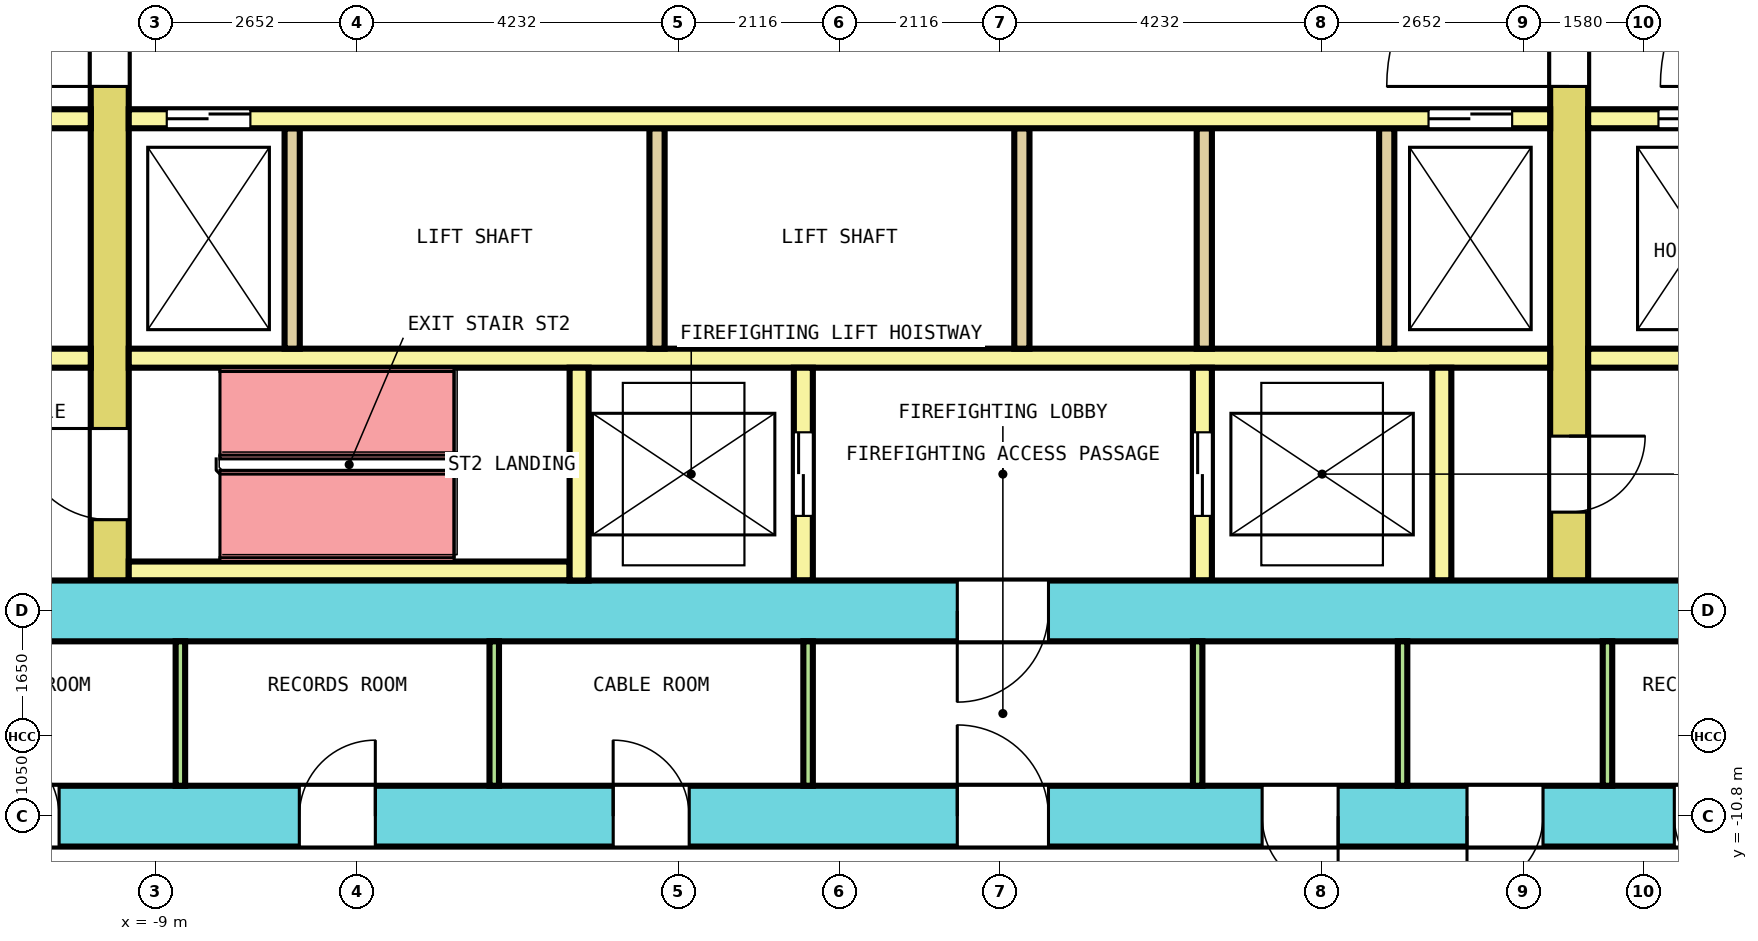
"""IFC4 building model, lengths in metres.
Left out: names, types, materials, properties, quantities, classifications, styles, units other than length and angle.
Written with IfcOpenShell. Run it as: python <this file> out.ifc"""

import sys

from ifc_helpers import new_model, si_unit, direction, frame, frame_2d, origin, place, context, subcontext, project, spatial, rectangle, extrude, element, fill, save


model = new_model("IFC4")
c1 = context("Model", 3, precision=1e-05, world=origin(), true_north=direction((0.0, 1.0)))
c2 = subcontext(c1, "Body", "Model", "MODEL_VIEW")
j1 = project(units=[si_unit("LENGTHUNIT", "METRE"), si_unit("PLANEANGLEUNIT", "RADIAN")], contexts=[c1])
p1 = place(None, origin())
s1 = spatial("IfcSite", under=j1, at=p1, CompositionType="ELEMENT")
p2 = place(p1, origin())
s2 = spatial("IfcBuilding", under=s1, at=p2, CompositionType="ELEMENT")
p3 = place(p2, frame((0.0, 0.0, 94.0)))
s3 = spatial("IfcBuildingStorey", under=s2, at=p3, CompositionType="ELEMENT", Elevation=94.0)
p4 = place(p3, frame((-13.6, -10.8, 0.0), z_axis=(0.0, 0.0, 1.0), x_axis=(1.0, 0.0, 0.0)))
e1 = element("IfcWall", 1, at=p4, inside=s3, PredefinedType="SHEAR", context=c2, shape_type="SweptSolid", body=[
    extrude(rectangle(XDim=27.2, YDim=0.8, at=frame_2d((13.6, 0.0))), origin(), (0.0, 0.0, 1.0), 4.1),
])
p5 = place(p4, frame((2.333, 0.0, 0.0)))
e2 = element("IfcOpeningElement", 2, at=p5, cuts=e1, PredefinedType="OPENING", context=c2, shape_type="SweptSolid", body=[
    extrude(rectangle(XDim=1.0, YDim=2.1, at=frame_2d((0.5, 1.05))), frame((0.0, 0.41, 0.0), z_axis=(0.0, -1.0, 0.0), x_axis=(1.0, 0.0, 0.0)), (0.0, 0.0, 1.0), 0.82),
])
p6 = place(p4, frame((6.494, 0.0, 0.0)))
e3 = element("IfcOpeningElement", 3, at=p6, cuts=e1, PredefinedType="OPENING", context=c2, shape_type="SweptSolid", body=[
    extrude(rectangle(XDim=1.0, YDim=2.1, at=frame_2d((0.5, 1.05))), frame((0.0, 0.41, 0.0), z_axis=(0.0, -1.0, 0.0), x_axis=(1.0, 0.0, 0.0)), (0.0, 0.0, 1.0), 0.82),
])
p7 = place(p4, frame((10.623, 0.0, 0.0)))
e4 = element("IfcOpeningElement", 4, at=p7, cuts=e1, PredefinedType="OPENING", context=c2, shape_type="SweptSolid", body=[
    extrude(rectangle(XDim=1.0, YDim=2.1, at=frame_2d((0.5, 1.05))), frame((0.0, 0.41, 0.0), z_axis=(0.0, -1.0, 0.0), x_axis=(1.0, 0.0, 0.0)), (0.0, 0.0, 1.0), 0.82),
])
p8 = place(p4, frame((19.16, 0.0, 0.0)))
e5 = element("IfcOpeningElement", 5, at=p8, cuts=e1, PredefinedType="OPENING", context=c2, shape_type="SweptSolid", body=[
    extrude(rectangle(XDim=1.0, YDim=2.1, at=frame_2d((0.5, 1.05))), frame((0.0, 0.41, 0.0), z_axis=(0.0, -1.0, 0.0), x_axis=(1.0, 0.0, 0.0)), (0.0, 0.0, 1.0), 0.82),
])
p9 = place(p4, frame((21.856, 0.0, 0.0)))
e6 = element("IfcOpeningElement", 6, at=p9, cuts=e1, PredefinedType="OPENING", context=c2, shape_type="SweptSolid", body=[
    extrude(rectangle(XDim=1.0, YDim=2.1, at=frame_2d((0.5, 1.05))), frame((0.0, 0.41, 0.0), z_axis=(0.0, -1.0, 0.0), x_axis=(1.0, 0.0, 0.0)), (0.0, 0.0, 1.0), 0.82),
])
p10 = place(p4, frame((24.583, 0.0, 0.0)))
e7 = element("IfcOpeningElement", 7, at=p10, cuts=e1, PredefinedType="OPENING", context=c2, shape_type="SweptSolid", body=[
    extrude(rectangle(XDim=1.0, YDim=2.1, at=frame_2d((0.5, 1.05))), frame((0.0, 0.41, 0.0), z_axis=(0.0, -1.0, 0.0), x_axis=(1.0, 0.0, 0.0)), (0.0, 0.0, 1.0), 0.82),
])
p11 = place(p4, frame((15.15, 0.0, 0.0)))
e8 = element("IfcOpeningElement", 8, at=p11, cuts=e1, PredefinedType="OPENING", context=c2, shape_type="SweptSolid", body=[
    extrude(rectangle(XDim=1.2, YDim=2.1, at=frame_2d((0.6, 1.05))), frame((0.0, 0.41, 0.0), z_axis=(0.0, -1.0, 0.0), x_axis=(1.0, 0.0, 0.0)), (0.0, 0.0, 1.0), 0.82),
])
p12 = place(p3, frame((-12.8, -8.1, 0.0), z_axis=(0.0, 0.0, 1.0), x_axis=(1.0, 0.0, 0.0)))
e9 = element("IfcWall", 9, at=p12, inside=s3, PredefinedType="SHEAR", context=c2, shape_type="SweptSolid", body=[
    extrude(rectangle(XDim=25.6, YDim=0.8, at=frame_2d((12.8, 0.0))), origin(), (0.0, 0.0, 1.0), 4.1),
])
p13 = place(p12, frame((14.35, 0.0, 0.0)))
e10 = element("IfcOpeningElement", 10, at=p13, cuts=e9, PredefinedType="OPENING", context=c2, shape_type="SweptSolid", body=[
    extrude(rectangle(XDim=1.2, YDim=2.1, at=frame_2d((0.6, 1.05))), frame((0.0, 0.41, 0.0), z_axis=(0.0, -1.0, 0.0), x_axis=(1.0, 0.0, 0.0)), (0.0, 0.0, 1.0), 0.82),
])
p14 = place(p3, frame((-9.6, -7.7, 0.0), z_axis=(0.0, 0.0, 1.0), x_axis=(0.0, 1.0, 0.0)))
e11 = element("IfcWall", 11, at=p14, inside=s3, PredefinedType="SHEAR", context=c2, shape_type="SweptSolid", body=[
    extrude(rectangle(XDim=15.4, YDim=0.5, at=frame_2d((7.7, 0.0))), origin(), (0.0, 0.0, 1.0), 4.1),
])
p15 = place(p14, frame((6.5, 0.0, 0.0)))
e12 = element("IfcOpeningElement", 12, at=p15, cuts=e11, PredefinedType="OPENING", context=c2, shape_type="SweptSolid", body=[
    extrude(rectangle(XDim=2.4, YDim=2.1, at=frame_2d((1.2, 1.05))), frame((0.0, 0.26, 0.0), z_axis=(0.0, -1.0, 0.0), x_axis=(1.0, 0.0, 0.0)), (0.0, 0.0, 1.0), 0.52),
])
p16 = place(p14, frame((13.4, 0.0, 0.0)))
e13 = element("IfcOpeningElement", 13, at=p16, cuts=e11, PredefinedType="OPENING", context=c2, shape_type="SweptSolid", body=[
    extrude(rectangle(XDim=1.2, YDim=2.1, at=frame_2d((0.6, 1.05))), frame((0.0, 0.26, 0.0), z_axis=(0.0, -1.0, 0.0), x_axis=(1.0, 0.0, 0.0)), (0.0, 0.0, 1.0), 0.52),
])
p17 = place(p14, frame((0.8, 0.0, 0.0)))
e14 = element("IfcOpeningElement", 14, at=p17, cuts=e11, PredefinedType="OPENING", context=c2, shape_type="SweptSolid", body=[
    extrude(rectangle(XDim=1.2, YDim=2.1, at=frame_2d((0.6, 1.05))), frame((0.0, 0.26, 0.0), z_axis=(0.0, -1.0, 0.0), x_axis=(1.0, 0.0, 0.0)), (0.0, 0.0, 1.0), 0.52),
])
p18 = place(p3, frame((9.6, -7.7, 0.0), z_axis=(0.0, 0.0, 1.0), x_axis=(0.0, 1.0, 0.0)))
e15 = element("IfcWall", 15, at=p18, inside=s3, PredefinedType="SHEAR", context=c2, shape_type="SweptSolid", body=[
    extrude(rectangle(XDim=15.4, YDim=0.5, at=frame_2d((7.7, 0.0))), origin(), (0.0, 0.0, 1.0), 4.1),
])
p19 = place(p18, frame((6.5, 0.0, 0.0)))
e16 = element("IfcOpeningElement", 16, at=p19, cuts=e15, PredefinedType="OPENING", context=c2, shape_type="SweptSolid", body=[
    extrude(rectangle(XDim=2.4, YDim=2.1, at=frame_2d((1.2, 1.05))), frame((0.0, 0.26, 0.0), z_axis=(0.0, -1.0, 0.0), x_axis=(1.0, 0.0, 0.0)), (0.0, 0.0, 1.0), 0.52),
])
p20 = place(p18, frame((13.4, 0.0, 0.0)))
e17 = element("IfcOpeningElement", 17, at=p20, cuts=e15, PredefinedType="OPENING", context=c2, shape_type="SweptSolid", body=[
    extrude(rectangle(XDim=1.2, YDim=2.1, at=frame_2d((0.6, 1.05))), frame((0.0, 0.26, 0.0), z_axis=(0.0, -1.0, 0.0), x_axis=(1.0, 0.0, 0.0)), (0.0, 0.0, 1.0), 0.52),
])
p21 = place(p18, frame((0.9, 0.0, 0.0)))
e18 = element("IfcOpeningElement", 18, at=p21, cuts=e15, PredefinedType="OPENING", context=c2, shape_type="SweptSolid", body=[
    extrude(rectangle(XDim=1.0, YDim=2.1, at=frame_2d((0.5, 1.05))), frame((0.0, 0.26, 0.0), z_axis=(0.0, -1.0, 0.0), x_axis=(1.0, 0.0, 0.0)), (0.0, 0.0, 1.0), 0.52),
])
p22 = place(p3, frame((-12.8, -1.625, 0.0), z_axis=(0.0, 0.0, 1.0), x_axis=(1.0, 0.0, 0.0)))
e19 = element("IfcWall", 19, at=p22, inside=s3, PredefinedType="SOLIDWALL", context=c2, shape_type="SweptSolid", body=[
    extrude(rectangle(XDim=2.95, YDim=0.25, at=frame_2d((1.475, 0.0))), origin(), (0.0, 0.0, 1.0), 4.1),
])
p23 = place(p22, frame((0.925, 0.0, 0.0)))
e20 = element("IfcOpeningElement", 20, at=p23, cuts=e19, PredefinedType="OPENING", context=c2, shape_type="SweptSolid", body=[
    extrude(rectangle(XDim=1.1, YDim=2.1, at=frame_2d((0.55, 1.05))), frame((0.0, 0.135, 0.0), z_axis=(0.0, -1.0, 0.0), x_axis=(1.0, 0.0, 0.0)), (0.0, 0.0, 1.0), 0.27),
])
p24 = place(p3, frame((-9.35, -1.625, 0.0), z_axis=(0.0, 0.0, 1.0), x_axis=(1.0, 0.0, 0.0)))
e21 = element("IfcWall", 21, at=p24, inside=s3, PredefinedType="SOLIDWALL", context=c2, shape_type="SweptSolid", body=[
    extrude(rectangle(XDim=18.7, YDim=0.25, at=frame_2d((9.35, 0.0))), origin(), (0.0, 0.0, 1.0), 4.1),
])
p25 = place(p24, frame((0.5, 0.0, 0.0)))
e22 = element("IfcOpeningElement", 22, at=p25, cuts=e21, PredefinedType="OPENING", context=c2, shape_type="SweptSolid", body=[
    extrude(rectangle(XDim=1.1, YDim=2.1, at=frame_2d((0.55, 1.05))), frame((0.0, 0.135, 0.0), z_axis=(0.0, -1.0, 0.0), x_axis=(1.0, 0.0, 0.0)), (0.0, 0.0, 1.0), 0.27),
])
p26 = place(p24, frame((17.1, 0.0, 0.0)))
e23 = element("IfcOpeningElement", 23, at=p26, cuts=e21, PredefinedType="OPENING", context=c2, shape_type="SweptSolid", body=[
    extrude(rectangle(XDim=1.1, YDim=2.1, at=frame_2d((0.55, 1.05))), frame((0.0, 0.135, 0.0), z_axis=(0.0, -1.0, 0.0), x_axis=(1.0, 0.0, 0.0)), (0.0, 0.0, 1.0), 0.27),
])
p27 = place(p3, frame((9.85, -1.625, 0.0), z_axis=(0.0, 0.0, 1.0), x_axis=(1.0, 0.0, 0.0)))
e24 = element("IfcWall", 24, at=p27, inside=s3, PredefinedType="SOLIDWALL", context=c2, shape_type="SweptSolid", body=[
    extrude(rectangle(XDim=2.95, YDim=0.25, at=frame_2d((1.475, 0.0))), origin(), (0.0, 0.0, 1.0), 4.1),
])
p28 = place(p27, frame((0.925, 0.0, 0.0)))
e25 = element("IfcOpeningElement", 25, at=p28, cuts=e24, PredefinedType="OPENING", context=c2, shape_type="SweptSolid", body=[
    extrude(rectangle(XDim=1.1, YDim=2.1, at=frame_2d((0.55, 1.05))), frame((0.0, 0.135, 0.0), z_axis=(0.0, -1.0, 0.0), x_axis=(1.0, 0.0, 0.0)), (0.0, 0.0, 1.0), 0.27),
])
p29 = place(p3, frame((-12.8, -4.775, 0.0), z_axis=(0.0, 0.0, 1.0), x_axis=(1.0, 0.0, 0.0)))
e26 = element("IfcWall", 26, at=p29, inside=s3, PredefinedType="SOLIDWALL", context=c2, shape_type="SweptSolid", body=[
    extrude(rectangle(XDim=2.95, YDim=0.25, at=frame_2d((1.475, 0.0))), origin(), (0.0, 0.0, 1.0), 4.1),
])
p30 = place(p3, frame((-9.35, -4.775, 0.0), z_axis=(0.0, 0.0, 1.0), x_axis=(1.0, 0.0, 0.0)))
e27 = element("IfcWall", 27, at=p30, inside=s3, PredefinedType="SOLIDWALL", context=c2, shape_type="SweptSolid", body=[
    extrude(rectangle(XDim=18.7, YDim=0.25, at=frame_2d((9.35, 0.0))), origin(), (0.0, 0.0, 1.0), 4.1),
])
p31 = place(p3, frame((9.85, -4.775, 0.0), z_axis=(0.0, 0.0, 1.0), x_axis=(1.0, 0.0, 0.0)))
e28 = element("IfcWall", 28, at=p31, inside=s3, PredefinedType="SOLIDWALL", context=c2, shape_type="SweptSolid", body=[
    extrude(rectangle(XDim=2.95, YDim=0.25, at=frame_2d((1.475, 0.0))), origin(), (0.0, 0.0, 1.0), 4.1),
])
for number, where, z_axis, x_axis in (
    (29, (-7.2, -4.65, 0.0), (0.0, 0.0, 1.0), (0.0, 1.0, 0.0)),
    (30, (-2.4, -4.65, 0.0), (0.0, 0.0, 1.0), (0.0, 1.0, 0.0)),
    (31, (2.4, -4.65, 0.0), (0.0, 0.0, 1.0), (0.0, 1.0, 0.0)),
    (32, (4.8, -4.65, 0.0), (0.0, 0.0, 1.0), (0.0, 1.0, 0.0)),
    (33, (7.2, -4.65, 0.0), (0.0, 0.0, 1.0), (0.0, 1.0, 0.0)),
):
    element("IfcWall", number, at=place(p3, frame(where, z_axis=z_axis, x_axis=x_axis)), inside=s3, PredefinedType="SOLIDWALL", context=c2, shape_type="SweptSolid", body=[
        extrude(rectangle(XDim=2.9, YDim=0.2, at=frame_2d((1.45, 0.0))), origin(), (0.0, 0.0, 1.0), 4.1),
    ])
p32 = place(p3, frame((-9.35, -7.575, 0.0), z_axis=(0.0, 0.0, 1.0), x_axis=(1.0, 0.0, 0.0)))
e34 = element("IfcWall", 34, at=p32, inside=s3, PredefinedType="SOLIDWALL", context=c2, shape_type="SweptSolid", body=[
    extrude(rectangle(XDim=5.8, YDim=0.25, at=frame_2d((2.9, 0.0))), origin(), (0.0, 0.0, 1.0), 4.1),
])
p33 = place(p3, frame((-3.425, -7.7, 0.0), z_axis=(0.0, 0.0, 1.0), x_axis=(0.0, 1.0, 0.0)))
e35 = element("IfcWall", 35, at=p33, inside=s3, PredefinedType="SOLIDWALL", context=c2, shape_type="SweptSolid", body=[
    extrude(rectangle(XDim=2.8, YDim=0.25, at=frame_2d((1.4, 0.0))), origin(), (0.0, 0.0, 1.0), 4.1),
])
p34 = place(p3, frame((-0.475, -7.7, 0.0), z_axis=(0.0, 0.0, 1.0), x_axis=(0.0, 1.0, 0.0)))
e36 = element("IfcWall", 36, at=p34, inside=s3, PredefinedType="SOLIDWALL", context=c2, shape_type="SweptSolid", body=[
    extrude(rectangle(XDim=2.8, YDim=0.25, at=frame_2d((1.4, 0.0))), origin(), (0.0, 0.0, 1.0), 4.1),
])
p35 = place(p34, frame((0.85, 0.0, 0.0)))
e37 = element("IfcOpeningElement", 37, at=p35, cuts=e36, PredefinedType="OPENING", context=c2, shape_type="SweptSolid", body=[
    extrude(rectangle(XDim=1.1, YDim=2.1, at=frame_2d((0.55, 1.05))), frame((0.0, 0.135, 0.0), z_axis=(0.0, -1.0, 0.0), x_axis=(1.0, 0.0, 0.0)), (0.0, 0.0, 1.0), 0.27),
])
p36 = place(p3, frame((4.775, -7.7, 0.0), z_axis=(0.0, 0.0, 1.0), x_axis=(0.0, 1.0, 0.0)))
e38 = element("IfcWall", 38, at=p36, inside=s3, PredefinedType="SOLIDWALL", context=c2, shape_type="SweptSolid", body=[
    extrude(rectangle(XDim=2.8, YDim=0.25, at=frame_2d((1.4, 0.0))), origin(), (0.0, 0.0, 1.0), 4.1),
])
p37 = place(p36, frame((0.85, 0.0, 0.0)))
e39 = element("IfcOpeningElement", 39, at=p37, cuts=e38, PredefinedType="OPENING", context=c2, shape_type="SweptSolid", body=[
    extrude(rectangle(XDim=1.1, YDim=2.1, at=frame_2d((0.55, 1.05))), frame((0.0, 0.135, 0.0), z_axis=(0.0, -1.0, 0.0), x_axis=(1.0, 0.0, 0.0)), (0.0, 0.0, 1.0), 0.27),
])
p38 = place(p3, frame((7.925, -7.7, 0.0), z_axis=(0.0, 0.0, 1.0), x_axis=(0.0, 1.0, 0.0)))
e40 = element("IfcWall", 40, at=p38, inside=s3, PredefinedType="SOLIDWALL", context=c2, shape_type="SweptSolid", body=[
    extrude(rectangle(XDim=2.8, YDim=0.25, at=frame_2d((1.4, 0.0))), origin(), (0.0, 0.0, 1.0), 4.1),
])
for number, where, z_axis, x_axis in (
    (41, (-8.671, -10.4, 0.0), (0.0, 0.0, 1.0), (0.0, 1.0, 0.0)),
    (42, (-4.542, -10.4, 0.0), (0.0, 0.0, 1.0), (0.0, 1.0, 0.0)),
    (43, (-0.413, -10.4, 0.0), (0.0, 0.0, 1.0), (0.0, 1.0, 0.0)),
    (44, (4.712, -10.4, 0.0), (0.0, 0.0, 1.0), (0.0, 1.0, 0.0)),
    (45, (7.408, -10.4, 0.0), (0.0, 0.0, 1.0), (0.0, 1.0, 0.0)),
    (46, (10.104, -10.4, 0.0), (0.0, 0.0, 1.0), (0.0, 1.0, 0.0)),
):
    element("IfcWall", number, at=place(p3, frame(where, z_axis=z_axis, x_axis=x_axis)), inside=s3, PredefinedType="PARTITIONING", context=c2, shape_type="SweptSolid", body=[
        extrude(rectangle(XDim=1.9, YDim=0.125, at=frame_2d((0.95, 0.0))), origin(), (0.0, 0.0, 1.0), 4.1),
    ])
p39 = place(p25, origin())
e47 = element("IfcDoor", 47, at=p39, inside=s3, OperationType="DOUBLE_DOOR_SLIDING", PredefinedType="DOOR", context=c2, shape_type="SweptSolid", body=[
    extrude(rectangle(XDim=1.1, YDim=2.1, at=frame_2d((0.55, 1.05))), frame((0.0, 0.075, 0.0), z_axis=(0.0, -1.0, 0.0), x_axis=(1.0, 0.0, 0.0)), (0.0, 0.0, 1.0), 0.15),
])
fill(e22, e47)
p40 = place(p26, origin())
e48 = element("IfcDoor", 48, at=p40, inside=s3, OperationType="DOUBLE_DOOR_SLIDING", PredefinedType="DOOR", context=c2, shape_type="SweptSolid", body=[
    extrude(rectangle(XDim=1.1, YDim=2.1, at=frame_2d((0.55, 1.05))), frame((0.0, 0.075, 0.0), z_axis=(0.0, -1.0, 0.0), x_axis=(1.0, 0.0, 0.0)), (0.0, 0.0, 1.0), 0.15),
])
fill(e23, e48)
p41 = place(p28, origin())
e49 = element("IfcDoor", 49, at=p41, inside=s3, OperationType="DOUBLE_DOOR_SLIDING", PredefinedType="DOOR", context=c2, shape_type="SweptSolid", body=[
    extrude(rectangle(XDim=1.1, YDim=2.1, at=frame_2d((0.55, 1.05))), frame((0.0, 0.075, 0.0), z_axis=(0.0, -1.0, 0.0), x_axis=(1.0, 0.0, 0.0)), (0.0, 0.0, 1.0), 0.15),
])
fill(e25, e49)
p42 = place(p35, origin())
e50 = element("IfcDoor", 50, at=p42, inside=s3, OperationType="DOUBLE_DOOR_SLIDING", PredefinedType="DOOR", context=c2, shape_type="SweptSolid", body=[
    extrude(rectangle(XDim=1.1, YDim=2.1, at=frame_2d((0.55, 1.05))), frame((0.0, 0.075, 0.0), z_axis=(0.0, -1.0, 0.0), x_axis=(1.0, 0.0, 0.0)), (0.0, 0.0, 1.0), 0.15),
])
fill(e37, e50)
p43 = place(p37, origin())
e51 = element("IfcDoor", 51, at=p43, inside=s3, OperationType="DOUBLE_DOOR_SLIDING", PredefinedType="DOOR", context=c2, shape_type="SweptSolid", body=[
    extrude(rectangle(XDim=1.1, YDim=2.1, at=frame_2d((0.55, 1.05))), frame((0.0, 0.075, 0.0), z_axis=(0.0, -1.0, 0.0), x_axis=(1.0, 0.0, 0.0)), (0.0, 0.0, 1.0), 0.15),
])
fill(e39, e51)
p44 = place(p15, origin())
e52 = element("IfcDoor", 52, at=p44, inside=s3, OperationType="DOUBLE_DOOR_SINGLE_SWING", PredefinedType="DOOR", context=c2, shape_type="SweptSolid", body=[
    extrude(rectangle(XDim=2.4, YDim=2.1, at=frame_2d((1.2, 1.05))), frame((0.0, 0.2, 0.0), z_axis=(0.0, -1.0, 0.0), x_axis=(1.0, 0.0, 0.0)), (0.0, 0.0, 1.0), 0.4),
])
fill(e12, e52)
p45 = place(p19, origin())
e53 = element("IfcDoor", 53, at=p45, inside=s3, OperationType="DOUBLE_DOOR_SINGLE_SWING", PredefinedType="DOOR", context=c2, shape_type="SweptSolid", body=[
    extrude(rectangle(XDim=2.4, YDim=2.1, at=frame_2d((1.2, 1.05))), frame((0.0, 0.2, 0.0), z_axis=(0.0, -1.0, 0.0), x_axis=(1.0, 0.0, 0.0)), (0.0, 0.0, 1.0), 0.4),
])
fill(e16, e53)
p46 = place(p17, origin())
e54 = element("IfcDoor", 54, at=p46, inside=s3, OperationType="SINGLE_SWING_LEFT", PredefinedType="DOOR", context=c2, shape_type="SweptSolid", body=[
    extrude(rectangle(XDim=1.2, YDim=2.1, at=frame_2d((0.6, 1.05))), frame((0.0, 0.2, 0.0), z_axis=(0.0, -1.0, 0.0), x_axis=(1.0, 0.0, 0.0)), (0.0, 0.0, 1.0), 0.4),
])
fill(e14, e54)
p47 = place(p13, origin())
e55 = element("IfcDoor", 55, at=p47, inside=s3, OperationType="SINGLE_SWING_LEFT", PredefinedType="DOOR", context=c2, shape_type="SweptSolid", body=[
    extrude(rectangle(XDim=1.2, YDim=2.1, at=frame_2d((0.6, 1.05))), frame((0.0, 0.3, 0.0), z_axis=(0.0, -1.0, 0.0), x_axis=(1.0, 0.0, 0.0)), (0.0, 0.0, 1.0), 0.6),
])
fill(e10, e55)
p48 = place(p21, origin())
e56 = element("IfcDoor", 56, at=p48, inside=s3, OperationType="SINGLE_SWING_LEFT", PredefinedType="DOOR", context=c2, shape_type="SweptSolid", body=[
    extrude(rectangle(XDim=1.0, YDim=2.1, at=frame_2d((0.5, 1.05))), frame((0.0, 0.2, 0.0), z_axis=(0.0, -1.0, 0.0), x_axis=(1.0, 0.0, 0.0)), (0.0, 0.0, 1.0), 0.4),
])
fill(e18, e56)
p49 = place(p5, origin())
e57 = element("IfcDoor", 57, at=p49, inside=s3, OperationType="SINGLE_SWING_LEFT", PredefinedType="DOOR", context=c2, shape_type="SweptSolid", body=[
    extrude(rectangle(XDim=1.0, YDim=2.1, at=frame_2d((0.5, 1.05))), frame((0.0, 0.3, 0.0), z_axis=(0.0, -1.0, 0.0), x_axis=(1.0, 0.0, 0.0)), (0.0, 0.0, 1.0), 0.6),
])
fill(e2, e57)
p50 = place(p6, origin())
e58 = element("IfcDoor", 58, at=p50, inside=s3, OperationType="SINGLE_SWING_RIGHT", PredefinedType="DOOR", context=c2, shape_type="SweptSolid", body=[
    extrude(rectangle(XDim=1.0, YDim=2.1, at=frame_2d((0.5, 1.05))), frame((0.0, 0.3, 0.0), z_axis=(0.0, -1.0, 0.0), x_axis=(1.0, 0.0, 0.0)), (0.0, 0.0, 1.0), 0.6),
])
fill(e3, e58)
p51 = place(p7, origin())
e59 = element("IfcDoor", 59, at=p51, inside=s3, OperationType="SINGLE_SWING_LEFT", PredefinedType="DOOR", context=c2, shape_type="SweptSolid", body=[
    extrude(rectangle(XDim=1.0, YDim=2.1, at=frame_2d((0.5, 1.05))), frame((0.0, 0.3, 0.0), z_axis=(0.0, -1.0, 0.0), x_axis=(1.0, 0.0, 0.0)), (0.0, 0.0, 1.0), 0.6),
])
fill(e4, e59)
p52 = place(p8, origin())
e60 = element("IfcDoor", 60, at=p52, inside=s3, OperationType="SINGLE_SWING_RIGHT", PredefinedType="DOOR", context=c2, shape_type="SweptSolid", body=[
    extrude(rectangle(XDim=1.0, YDim=2.1, at=frame_2d((0.5, 1.05))), frame((0.0, 0.3, 0.0), z_axis=(0.0, -1.0, 0.0), x_axis=(1.0, 0.0, 0.0)), (0.0, 0.0, 1.0), 0.6),
])
fill(e5, e60)
p53 = place(p9, origin())
e61 = element("IfcDoor", 61, at=p53, inside=s3, OperationType="SINGLE_SWING_LEFT", PredefinedType="DOOR", context=c2, shape_type="SweptSolid", body=[
    extrude(rectangle(XDim=1.0, YDim=2.1, at=frame_2d((0.5, 1.05))), frame((0.0, 0.3, 0.0), z_axis=(0.0, -1.0, 0.0), x_axis=(1.0, 0.0, 0.0)), (0.0, 0.0, 1.0), 0.6),
])
fill(e6, e61)
p54 = place(p10, origin())
e62 = element("IfcDoor", 62, at=p54, inside=s3, OperationType="SINGLE_SWING_RIGHT", PredefinedType="DOOR", context=c2, shape_type="SweptSolid", body=[
    extrude(rectangle(XDim=1.0, YDim=2.1, at=frame_2d((0.5, 1.05))), frame((0.0, 0.3, 0.0), z_axis=(0.0, -1.0, 0.0), x_axis=(1.0, 0.0, 0.0)), (0.0, 0.0, 1.0), 0.6),
])
fill(e7, e62)
p55 = place(p11, origin())
e63 = element("IfcDoor", 63, at=p55, inside=s3, OperationType="SINGLE_SWING_LEFT", PredefinedType="DOOR", context=c2, shape_type="SweptSolid", body=[
    extrude(rectangle(XDim=1.2, YDim=2.1, at=frame_2d((0.6, 1.05))), frame((0.0, 0.3, 0.0), z_axis=(0.0, -1.0, 0.0), x_axis=(1.0, 0.0, 0.0)), (0.0, 0.0, 1.0), 0.6),
])
fill(e8, e63)
save(model, sys.argv[1])
